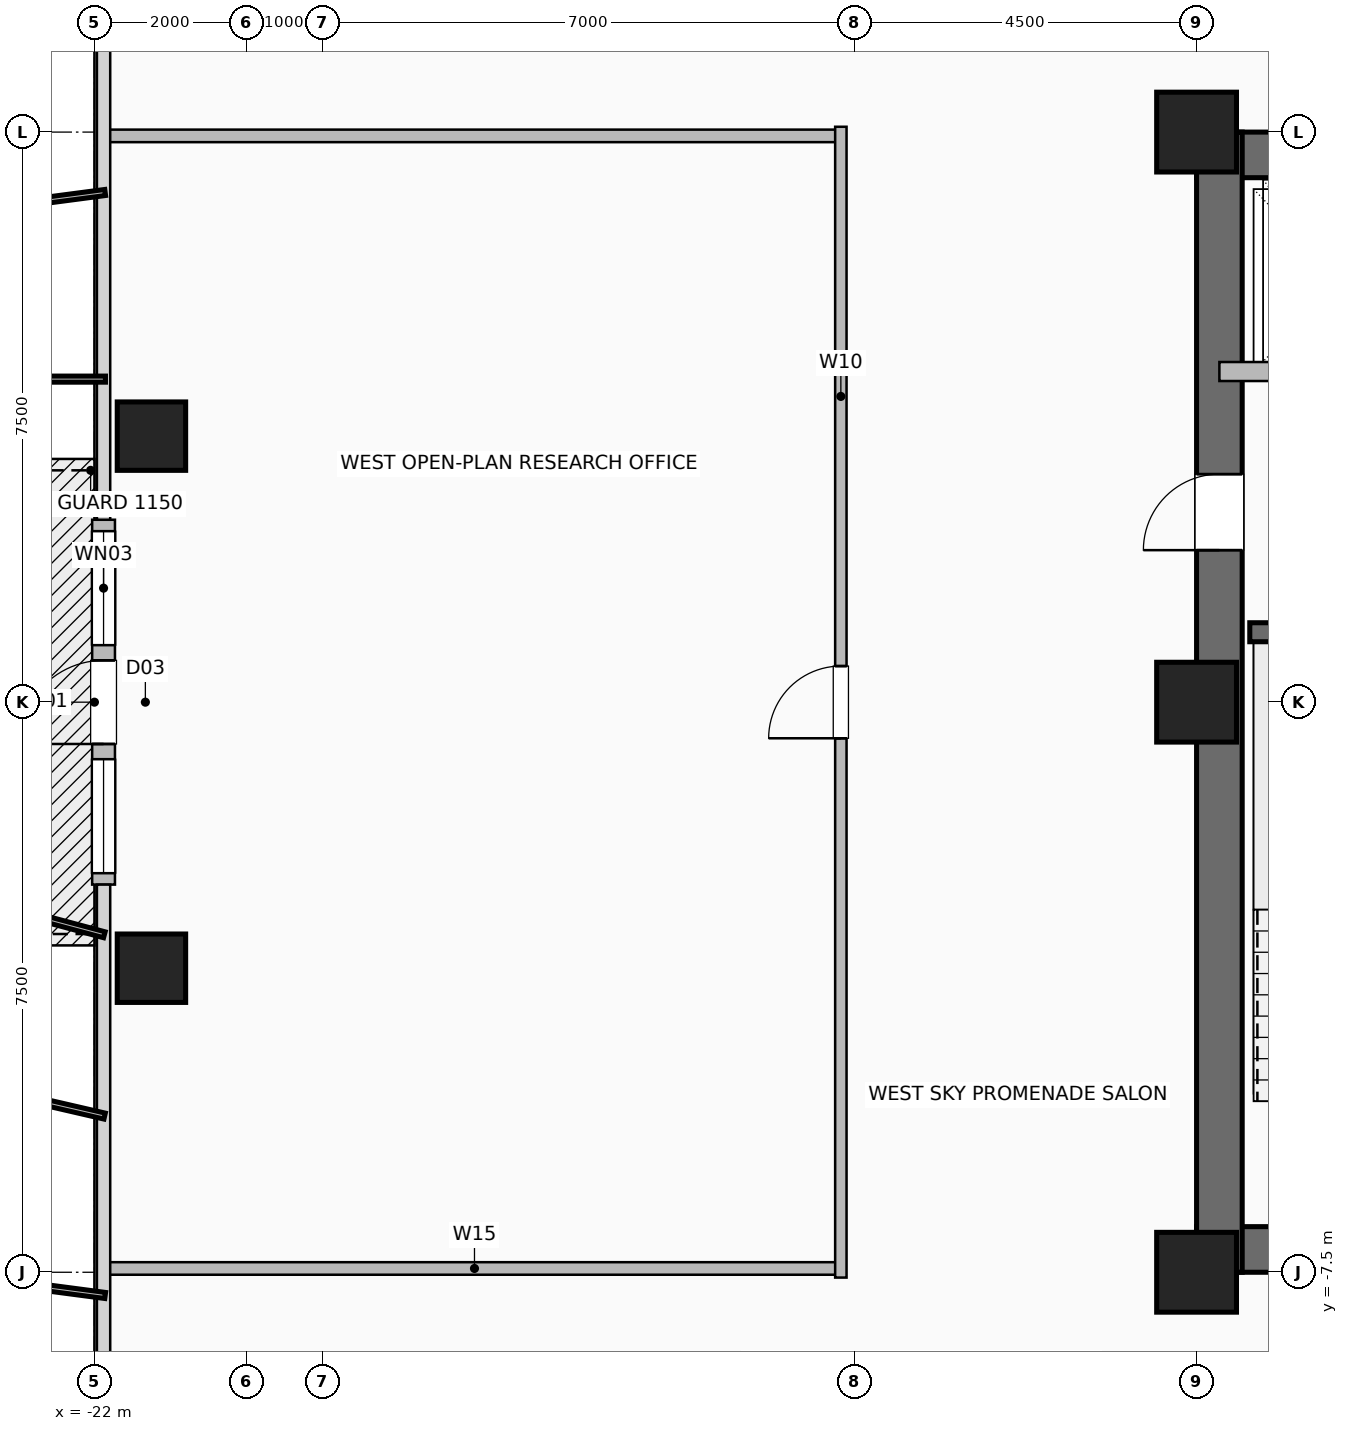
"""IFC4 building model, lengths in metres.
Left out: names, types, materials, properties, quantities, classifications, styles, units other than length and angle.
Written with IfcOpenShell. Run it as: python <this file> out.ifc"""

import sys

from ifc_helpers import new_model, si_unit, direction, frame, frame_2d, origin, origin_2d, place, context, subcontext, project, spatial, rectangle, hollow_rectangle, extrude, element, fill, save


model = new_model("IFC4")
c1 = context("Model", 3, precision=1e-05, world=origin(), true_north=direction((0.0, 1.0)))
c2 = subcontext(c1, "Body", "Model", "MODEL_VIEW")
j1 = project(units=[si_unit("LENGTHUNIT", "METRE"), si_unit("PLANEANGLEUNIT", "RADIAN")], contexts=[c1])
p1 = place(None, origin())
s1 = spatial("IfcSite", under=j1, at=p1, CompositionType="ELEMENT")
p2 = place(p1, origin())
s2 = spatial("IfcBuilding", under=s1, at=p2, CompositionType="ELEMENT")
p3 = place(p2, frame((0.0, 0.0, 115.6)))
s3 = spatial("IfcBuildingStorey", under=s2, at=p3, CompositionType="ELEMENT", Elevation=115.6)
for number, where, z_axis, x_axis in (
    (1, (-7.5, -7.5, 0.0), (0.0, 0.0, 1.0), (1.0, 0.0, 0.0)),
    (2, (-7.5, 7.5, 0.0), (0.0, 0.0, 1.0), (1.0, 0.0, 0.0)),
    (3, (-7.5, 0.0, 0.0), (0.0, 0.0, 1.0), (1.0, 0.0, 0.0)),
):
    element("IfcColumn", number, at=place(p3, frame(where, z_axis=z_axis, x_axis=x_axis)), inside=s3, PredefinedType="COLUMN", context=c2, shape_type="SweptSolid", body=[
        extrude(hollow_rectangle(XDim=1.05, YDim=1.05, WallThickness=0.05, at=origin_2d()), origin(), (0.0, 0.0, 1.0), 3.6),
    ])
for number, where, z_axis, x_axis in (
    (4, (-21.25, -3.5, 0.0), (0.0, 0.0, 1.0), (1.0, 0.0, 0.0)),
    (5, (-21.25, 3.5, 0.0), (0.0, 0.0, 1.0), (1.0, 0.0, 0.0)),
):
    element("IfcColumn", number, at=place(p3, frame(where, z_axis=z_axis, x_axis=x_axis)), inside=s3, PredefinedType="COLUMN", context=c2, shape_type="SweptSolid", body=[
        extrude(hollow_rectangle(XDim=0.9, YDim=0.9, WallThickness=0.045, at=origin_2d()), origin(), (0.0, 0.0, 1.0), 3.6),
    ])
p4 = place(p3, frame((-21.88, -2.4, 0.0), z_axis=(0.0, 0.0, 1.0), x_axis=(0.0, 1.0, 0.0)))
e6 = element("IfcWall", 6, at=p4, inside=s3, PredefinedType="SOLIDWALL", context=c2, shape_type="SweptSolid", body=[
    extrude(rectangle(XDim=4.8, YDim=0.3, at=frame_2d((2.4, 0.0))), origin(), (0.0, 0.0, 1.0), 3.36),
])
p5 = place(p4, frame((1.85, 0.0, 0.0)))
e7 = element("IfcOpeningElement", 7, at=p5, cuts=e6, PredefinedType="OPENING", context=c2, shape_type="SweptSolid", body=[
    extrude(rectangle(XDim=1.1, YDim=2.2, at=frame_2d((0.55, 1.1))), frame((0.0, 0.16, 0.0), z_axis=(0.0, -1.0, 0.0), x_axis=(1.0, 0.0, 0.0)), (0.0, 0.0, 1.0), 0.32),
])
p6 = place(p4, frame((0.15, 0.0, 0.85)))
e8 = element("IfcOpeningElement", 8, at=p6, cuts=e6, PredefinedType="OPENING", context=c2, shape_type="SweptSolid", body=[
    extrude(rectangle(XDim=1.5, YDim=1.8, at=frame_2d((0.75, 0.9))), frame((0.0, 0.16, 0.0), z_axis=(0.0, -1.0, 0.0), x_axis=(1.0, 0.0, 0.0)), (0.0, 0.0, 1.0), 0.32),
])
p7 = place(p4, frame((3.15, 0.0, 0.85)))
e9 = element("IfcOpeningElement", 9, at=p7, cuts=e6, PredefinedType="OPENING", context=c2, shape_type="SweptSolid", body=[
    extrude(rectangle(XDim=1.5, YDim=1.8, at=frame_2d((0.75, 0.9))), frame((0.0, 0.16, 0.0), z_axis=(0.0, -1.0, 0.0), x_axis=(1.0, 0.0, 0.0)), (0.0, 0.0, 1.0), 0.32),
])
p8 = place(p3, frame((-7.5, -7.2, 0.0), z_axis=(0.0, 0.0, 1.0), x_axis=(1.0, 0.0, 0.0)))
e10 = element("IfcWall", 10, at=p8, inside=s3, PredefinedType="SHEAR", context=c2, shape_type="SweptSolid", body=[
    extrude(rectangle(XDim=15.0, YDim=0.6, at=frame_2d((7.5, 0.0))), origin(), (0.0, 0.0, 1.0), 3.36),
])
p9 = place(p8, frame((1.55, 0.0, 0.0)))
e11 = element("IfcOpeningElement", 11, at=p9, cuts=e10, PredefinedType="OPENING", context=c2, shape_type="SweptSolid", body=[
    extrude(rectangle(XDim=1.05, YDim=2.08, at=frame_2d((0.525, 1.04))), frame((0.0, 0.31, 0.0), z_axis=(0.0, -1.0, 0.0), x_axis=(1.0, 0.0, 0.0)), (0.0, 0.0, 1.0), 0.62),
])
p10 = place(p8, frame((12.4, 0.0, 0.0)))
e12 = element("IfcOpeningElement", 12, at=p10, cuts=e10, PredefinedType="OPENING", context=c2, shape_type="SweptSolid", body=[
    extrude(rectangle(XDim=1.05, YDim=2.08, at=frame_2d((0.525, 1.04))), frame((0.0, 0.31, 0.0), z_axis=(0.0, -1.0, 0.0), x_axis=(1.0, 0.0, 0.0)), (0.0, 0.0, 1.0), 0.62),
])
p11 = place(p8, frame((4.95, 0.0, 0.0)))
e13 = element("IfcOpeningElement", 13, at=p11, cuts=e10, PredefinedType="OPENING", context=c2, shape_type="SweptSolid", body=[
    extrude(rectangle(XDim=1.0, YDim=2.08, at=frame_2d((0.5, 1.04))), frame((0.0, 0.31, 0.0), z_axis=(0.0, -1.0, 0.0), x_axis=(1.0, 0.0, 0.0)), (0.0, 0.0, 1.0), 0.62),
])
p12 = place(p8, frame((7.05, 0.0, 0.0)))
e14 = element("IfcOpeningElement", 14, at=p12, cuts=e10, PredefinedType="OPENING", context=c2, shape_type="SweptSolid", body=[
    extrude(rectangle(XDim=1.0, YDim=2.08, at=frame_2d((0.5, 1.04))), frame((0.0, 0.31, 0.0), z_axis=(0.0, -1.0, 0.0), x_axis=(1.0, 0.0, 0.0)), (0.0, 0.0, 1.0), 0.62),
])
p13 = place(p8, frame((9.15, 0.0, 0.0)))
e15 = element("IfcOpeningElement", 15, at=p13, cuts=e10, PredefinedType="OPENING", context=c2, shape_type="SweptSolid", body=[
    extrude(rectangle(XDim=1.0, YDim=2.08, at=frame_2d((0.5, 1.04))), frame((0.0, 0.31, 0.0), z_axis=(0.0, -1.0, 0.0), x_axis=(1.0, 0.0, 0.0)), (0.0, 0.0, 1.0), 0.62),
])
p14 = place(p3, frame((-7.5, 7.2, 0.0), z_axis=(0.0, 0.0, 1.0), x_axis=(1.0, 0.0, 0.0)))
e16 = element("IfcWall", 16, at=p14, inside=s3, PredefinedType="SHEAR", context=c2, shape_type="SweptSolid", body=[
    extrude(rectangle(XDim=15.0, YDim=0.6, at=frame_2d((7.5, 0.0))), origin(), (0.0, 0.0, 1.0), 3.36),
])
p15 = place(p3, frame((-7.2, -7.5, 0.0), z_axis=(0.0, 0.0, 1.0), x_axis=(0.0, 1.0, 0.0)))
e17 = element("IfcWall", 17, at=p15, inside=s3, PredefinedType="SHEAR", context=c2, shape_type="SweptSolid", body=[
    extrude(rectangle(XDim=15.0, YDim=0.6, at=frame_2d((7.5, 0.0))), origin(), (0.0, 0.0, 1.0), 3.36),
])
p16 = place(p15, frame((9.5, 0.0, 0.0)))
e18 = element("IfcOpeningElement", 18, at=p16, cuts=e17, PredefinedType="OPENING", context=c2, shape_type="SweptSolid", body=[
    extrude(rectangle(XDim=1.0, YDim=2.08, at=frame_2d((0.5, 1.04))), frame((0.0, 0.31, 0.0), z_axis=(0.0, -1.0, 0.0), x_axis=(1.0, 0.0, 0.0)), (0.0, 0.0, 1.0), 0.62),
])
p17 = place(p3, frame((-6.8, 0.92, 0.0), z_axis=(0.0, 0.0, 1.0), x_axis=(1.0, 0.0, 0.0)))
e19 = element("IfcWall", 19, at=p17, inside=s3, PredefinedType="SHEAR", context=c2, shape_type="SweptSolid", body=[
    extrude(rectangle(XDim=3.33, YDim=0.25, at=frame_2d((1.665, 0.0))), origin(), (0.0, 0.0, 1.0), 3.36),
])
p18 = place(p3, frame((-7.2, 4.35, 0.0), z_axis=(0.0, 0.0, 1.0), x_axis=(1.0, 0.0, 0.0)))
e20 = element("IfcWall", 20, at=p18, inside=s3, PredefinedType="SHEAR", context=c2, shape_type="SweptSolid", body=[
    extrude(rectangle(XDim=2.7, YDim=0.25, at=frame_2d((1.35, 0.0))), origin(), (0.0, 0.0, 1.0), 3.36),
])
p19 = place(p18, frame((0.75, 0.0, 0.0)))
e21 = element("IfcOpeningElement", 21, at=p19, cuts=e20, PredefinedType="OPENING", context=c2, shape_type="SweptSolid", body=[
    extrude(rectangle(XDim=1.2, YDim=2.2, at=frame_2d((0.6, 1.1))), frame((0.0, 0.135, 0.0), z_axis=(0.0, -1.0, 0.0), x_axis=(1.0, 0.0, 0.0)), (0.0, 0.0, 1.0), 0.27),
])
for number, where, z_axis, x_axis in (
    (22, (-21.82, -7.45, 0.0), (0.0, 0.0, 1.0), (1.0, 0.0, 0.0)),
    (23, (-21.82, 7.45, 0.0), (0.0, 0.0, 1.0), (1.0, 0.0, 0.0)),
):
    element("IfcWall", number, at=place(p3, frame(where, z_axis=z_axis, x_axis=x_axis)), inside=s3, PredefinedType="PLUMBINGWALL", context=c2, shape_type="SweptSolid", body=[
        extrude(rectangle(XDim=9.64, YDim=0.165, at=frame_2d((4.82, 0.0))), origin(), (0.0, 0.0, 1.0), 3.36),
    ])
p20 = place(p3, frame((-12.18, -7.57, 0.0), z_axis=(0.0, 0.0, 1.0), x_axis=(0.0, 1.0, 0.0)))
e24 = element("IfcWall", 24, at=p20, inside=s3, PredefinedType="PARTITIONING", context=c2, shape_type="SweptSolid", body=[
    extrude(rectangle(XDim=15.14, YDim=0.15, at=frame_2d((7.57, 0.0))), origin(), (0.0, 0.0, 1.0), 3.36),
])
p21 = place(p20, frame((7.095, 0.0, 0.0)))
e25 = element("IfcOpeningElement", 25, at=p21, cuts=e24, PredefinedType="OPENING", context=c2, shape_type="SweptSolid", body=[
    extrude(rectangle(XDim=0.95, YDim=2.06, at=frame_2d((0.475, 1.03))), frame((0.0, 0.085, 0.0), z_axis=(0.0, -1.0, 0.0), x_axis=(1.0, 0.0, 0.0)), (0.0, 0.0, 1.0), 0.17),
])
p22 = place(p5, origin())
e26 = element("IfcDoor", 26, at=p22, inside=s3, OperationType="SINGLE_SWING_LEFT", PredefinedType="DOOR", context=c2, shape_type="SweptSolid", body=[
    extrude(rectangle(XDim=1.1, YDim=2.2, at=frame_2d((0.55, 1.1))), frame((0.0, 0.025, 0.0), z_axis=(0.0, -1.0, 0.0), x_axis=(1.0, 0.0, 0.0)), (0.0, 0.0, 1.0), 0.05),
])
fill(e7, e26)
p23 = place(p6, origin())
e27 = element("IfcWindow", 27, at=p23, inside=s3, PartitioningType="SINGLE_PANEL", PredefinedType="WINDOW", context=c2, shape_type="SweptSolid", body=[
    extrude(rectangle(XDim=1.5, YDim=1.8, at=frame_2d((0.75, 0.9))), frame((0.0, 0.03, 0.0), z_axis=(0.0, -1.0, 0.0), x_axis=(1.0, 0.0, 0.0)), (0.0, 0.0, 1.0), 0.06),
])
fill(e8, e27)
p24 = place(p7, origin())
e28 = element("IfcWindow", 28, at=p24, inside=s3, PartitioningType="SINGLE_PANEL", PredefinedType="WINDOW", context=c2, shape_type="SweptSolid", body=[
    extrude(rectangle(XDim=1.5, YDim=1.8, at=frame_2d((0.75, 0.9))), frame((0.0, 0.03, 0.0), z_axis=(0.0, -1.0, 0.0), x_axis=(1.0, 0.0, 0.0)), (0.0, 0.0, 1.0), 0.06),
])
fill(e9, e28)
p25 = place(p16, origin())
e29 = element("IfcDoor", 29, at=p25, inside=s3, OperationType="SINGLE_SWING_LEFT", PredefinedType="DOOR", context=c2, shape_type="SweptSolid", body=[
    extrude(rectangle(XDim=1.0, YDim=2.08, at=frame_2d((0.5, 1.04))), frame((0.0, 0.025, 0.0), z_axis=(0.0, -1.0, 0.0), x_axis=(1.0, 0.0, 0.0)), (0.0, 0.0, 1.0), 0.05),
])
fill(e18, e29)
p26 = place(p21, origin())
e30 = element("IfcDoor", 30, at=p26, inside=s3, OperationType="SINGLE_SWING_LEFT", PredefinedType="DOOR", context=c2, shape_type="SweptSolid", body=[
    extrude(rectangle(XDim=0.95, YDim=2.06, at=frame_2d((0.475, 1.03))), frame((0.0, 0.025, 0.0), z_axis=(0.0, -1.0, 0.0), x_axis=(1.0, 0.0, 0.0)), (0.0, 0.0, 1.0), 0.05),
])
fill(e25, e30)
save(model, sys.argv[1])
